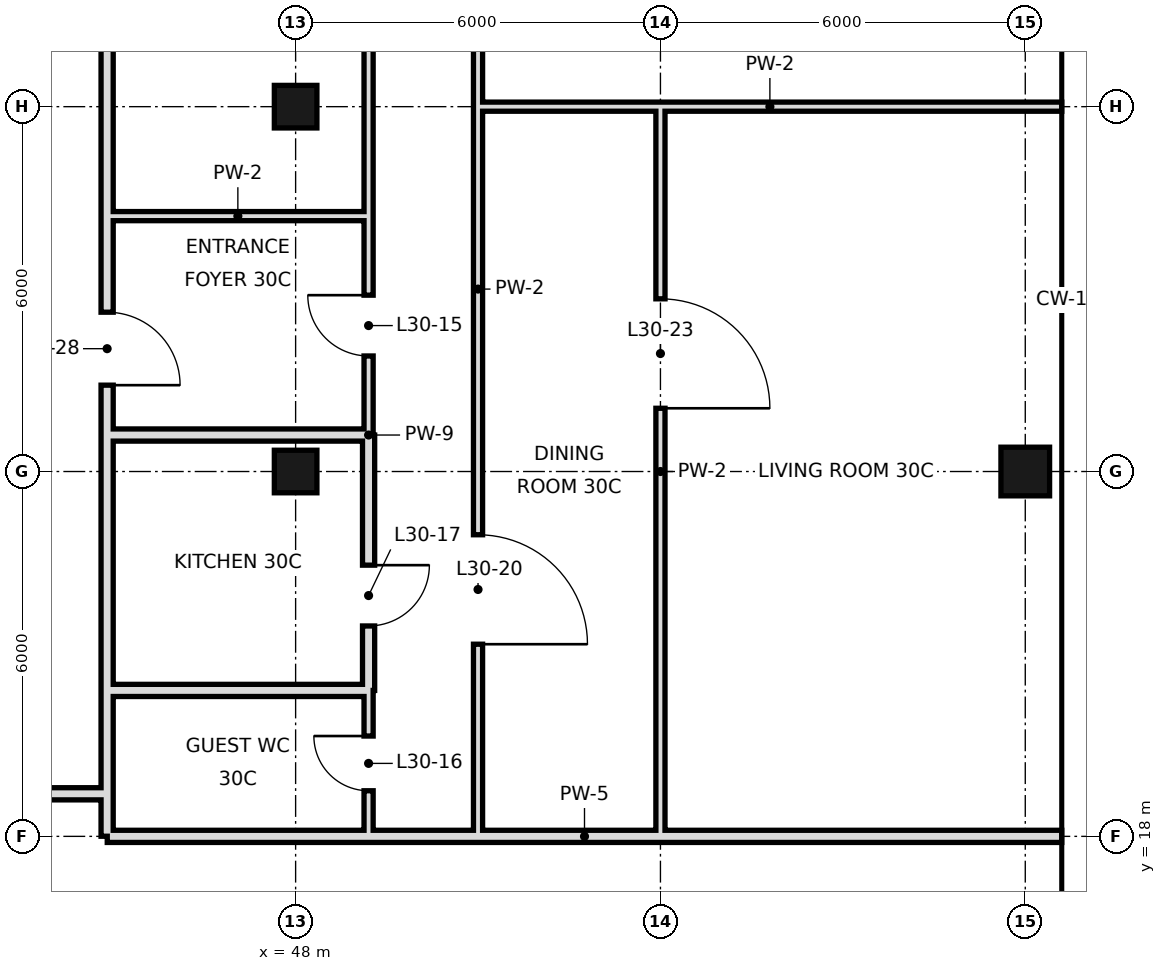
"""IFC4 building model, lengths in metres.
Left out: names, types, materials, properties, quantities, classifications, styles, units other than length and angle.
Written with IfcOpenShell. Run it as: python <this file> out.ifc"""

import sys

from ifc_helpers import new_model, si_unit, direction, frame, frame_2d, origin, origin_2d, place, context, subcontext, project, spatial, rectangle, hollow_rectangle, extrude, element, fill, save


model = new_model("IFC4")
c1 = context("Model", 3, precision=1e-05, world=origin(), true_north=direction((0.0, 1.0)))
c2 = subcontext(c1, "Body", "Model", "MODEL_VIEW")
j1 = project(units=[si_unit("LENGTHUNIT", "METRE"), si_unit("PLANEANGLEUNIT", "RADIAN")], contexts=[c1])
p1 = place(None, origin())
s1 = spatial("IfcSite", under=j1, at=p1, CompositionType="ELEMENT")
p2 = place(p1, origin())
s2 = spatial("IfcBuilding", under=s1, at=p2, CompositionType="ELEMENT")
p3 = place(p2, frame((0.0, 0.0, 134.0)))
s3 = spatial("IfcBuildingStorey", under=s2, at=p3, CompositionType="ELEMENT", Elevation=134.0)
for number, where, z_axis, x_axis in (
    (1, (48.0, 24.0, 0.0), (0.0, 0.0, 1.0), (1.0, 0.0, 0.0)),
    (2, (48.0, 30.0, 0.0), (0.0, 0.0, 1.0), (1.0, 0.0, 0.0)),
):
    element("IfcColumn", number, at=place(p3, frame(where, z_axis=z_axis, x_axis=x_axis)), inside=s3, PredefinedType="COLUMN", context=c2, shape_type="SweptSolid", body=[
        extrude(hollow_rectangle(XDim=0.7, YDim=0.7, WallThickness=0.036, at=origin_2d()), origin(), (0.0, 0.0, 1.0), 4.4),
    ])
p4 = place(p3, frame((60.0, 24.0, 0.0), z_axis=(0.0, 0.0, 1.0), x_axis=(1.0, 0.0, 0.0)))
e3 = element("IfcColumn", 3, at=p4, inside=s3, PredefinedType="COLUMN", context=c2, shape_type="SweptSolid", body=[
    extrude(hollow_rectangle(XDim=0.8, YDim=0.8, WallThickness=0.04, at=origin_2d()), origin(), (0.0, 0.0, 1.0), 4.4),
])
p5 = place(p3, frame((44.9, 18.002, 0.0), z_axis=(0.0, 0.0, 1.0), x_axis=(0.0, 1.0, 0.0)))
e4 = element("IfcWall", 4, at=p5, inside=s3, PredefinedType="SOLIDWALL", context=c2, shape_type="SweptSolid", body=[
    extrude(rectangle(XDim=2.398, YDim=0.2, at=frame_2d((1.199, 0.0))), origin(), (0.0, 0.0, 1.0), 4.1),
])
p6 = place(p3, frame((44.9, 24.6, 0.0), z_axis=(0.0, 0.0, 1.0), x_axis=(0.0, 1.0, 0.0)))
e5 = element("IfcWall", 5, at=p6, inside=s3, PredefinedType="SOLIDWALL", context=c2, shape_type="SweptSolid", body=[
    extrude(rectangle(XDim=24.0, YDim=0.2, at=frame_2d((12.0, 0.0))), origin(), (0.0, 0.0, 1.0), 3.4),
])
p7 = place(p6, frame((0.82, 0.0, 0.0)))
e6 = element("IfcOpeningElement", 6, at=p7, cuts=e5, PredefinedType="OPENING", context=c2, shape_type="SweptSolid", body=[
    extrude(rectangle(XDim=1.2, YDim=2.4, at=frame_2d((0.6, 1.2))), frame((0.0, 0.11, 0.0), z_axis=(0.0, -1.0, 0.0), x_axis=(1.0, 0.0, 0.0)), (0.0, 0.0, 1.0), 0.22),
])
p8 = place(p3, frame((44.9, 20.4, 0.0), z_axis=(0.0, 0.0, 1.0), x_axis=(0.0, 1.0, 0.0)))
e7 = element("IfcWall", 7, at=p8, inside=s3, PredefinedType="SOLIDWALL", context=c2, shape_type="SweptSolid", body=[
    extrude(rectangle(XDim=4.2, YDim=0.2, at=frame_2d((2.1, 0.0))), origin(), (0.0, 0.0, 1.0), 4.1),
])
p9 = place(p3, frame((49.2, 20.4, 0.0), z_axis=(0.0, 0.0, 1.0), x_axis=(0.0, 1.0, 0.0)))
e8 = element("IfcWall", 8, at=p9, inside=s3, PredefinedType="SOLIDWALL", context=c2, shape_type="SweptSolid", body=[
    extrude(rectangle(XDim=4.2, YDim=0.2, at=frame_2d((2.1, 0.0))), origin(), (0.0, 0.0, 1.0), 3.4),
])
p10 = place(p9, frame((1.06, 0.0, 0.0)))
e9 = element("IfcOpeningElement", 9, at=p10, cuts=e8, PredefinedType="OPENING", context=c2, shape_type="SweptSolid", body=[
    extrude(rectangle(XDim=1.0, YDim=2.4, at=frame_2d((0.5, 1.2))), frame((0.0, 0.11, 0.0), z_axis=(0.0, -1.0, 0.0), x_axis=(1.0, 0.0, 0.0)), (0.0, 0.0, 1.0), 0.22),
])
p11 = place(p3, frame((49.2, 24.6, 0.0), z_axis=(0.0, 0.0, 1.0), x_axis=(0.0, 1.0, 0.0)))
e10 = element("IfcWall", 10, at=p11, inside=s3, PredefinedType="PARTITIONING", context=c2, shape_type="SweptSolid", body=[
    extrude(rectangle(XDim=24.0, YDim=0.15, at=frame_2d((12.0, 0.0))), origin(), (0.0, 0.0, 1.0), 4.1),
])
p12 = place(p11, frame((1.3, 0.0, 0.0)))
e11 = element("IfcOpeningElement", 11, at=p12, cuts=e10, PredefinedType="OPENING", context=c2, shape_type="SweptSolid", body=[
    extrude(rectangle(XDim=1.0, YDim=2.4, at=frame_2d((0.5, 1.2))), frame((0.0, 0.085, 0.0), z_axis=(0.0, -1.0, 0.0), x_axis=(1.0, 0.0, 0.0)), (0.0, 0.0, 1.0), 0.17),
])
p13 = place(p11, frame((7.0, 0.0, 0.0)))
e12 = element("IfcOpeningElement", 12, at=p13, cuts=e10, PredefinedType="OPENING", context=c2, shape_type="SweptSolid", body=[
    extrude(rectangle(XDim=1.0, YDim=2.4, at=frame_2d((0.5, 1.2))), frame((0.0, 0.085, 0.0), z_axis=(0.0, -1.0, 0.0), x_axis=(1.0, 0.0, 0.0)), (0.0, 0.0, 1.0), 0.17),
])
p14 = place(p11, frame((14.8, 0.0, 0.0)))
e13 = element("IfcOpeningElement", 13, at=p14, cuts=e10, PredefinedType="OPENING", context=c2, shape_type="SweptSolid", body=[
    extrude(rectangle(XDim=1.0, YDim=2.4, at=frame_2d((0.5, 1.2))), frame((0.0, 0.085, 0.0), z_axis=(0.0, -1.0, 0.0), x_axis=(1.0, 0.0, 0.0)), (0.0, 0.0, 1.0), 0.17),
])
p15 = place(p3, frame((49.2, 18.0, 0.0), z_axis=(0.0, 0.0, 1.0), x_axis=(0.0, 1.0, 0.0)))
e14 = element("IfcWall", 14, at=p15, inside=s3, PredefinedType="PARTITIONING", context=c2, shape_type="SweptSolid", body=[
    extrude(rectangle(XDim=2.4, YDim=0.15, at=frame_2d((1.2, 0.0))), origin(), (0.0, 0.0, 1.0), 4.1),
])
p16 = place(p15, frame((0.75, 0.0, 0.0)))
e15 = element("IfcOpeningElement", 15, at=p16, cuts=e14, PredefinedType="OPENING", context=c2, shape_type="SweptSolid", body=[
    extrude(rectangle(XDim=0.9, YDim=2.4, at=frame_2d((0.45, 1.2))), frame((0.0, 0.085, 0.0), z_axis=(0.0, -1.0, 0.0), x_axis=(1.0, 0.0, 0.0)), (0.0, 0.0, 1.0), 0.17),
])
p17 = place(p3, frame((51.0, 18.0, 0.0), z_axis=(0.0, 0.0, 1.0), x_axis=(0.0, 1.0, 0.0)))
e16 = element("IfcWall", 16, at=p17, inside=s3, PredefinedType="PARTITIONING", context=c2, shape_type="SweptSolid", body=[
    extrude(rectangle(XDim=18.0, YDim=0.15, at=frame_2d((9.0, 0.0))), origin(), (0.0, 0.0, 1.0), 4.1),
])
p18 = place(p17, frame((3.16, 0.0, 0.0)))
e17 = element("IfcOpeningElement", 17, at=p18, cuts=e16, PredefinedType="OPENING", context=c2, shape_type="SweptSolid", body=[
    extrude(rectangle(XDim=1.8, YDim=2.4, at=frame_2d((0.9, 1.2))), frame((0.0, 0.085, 0.0), z_axis=(0.0, -1.0, 0.0), x_axis=(1.0, 0.0, 0.0)), (0.0, 0.0, 1.0), 0.17),
])
p19 = place(p17, frame((13.6, 0.0, 0.0)))
e18 = element("IfcOpeningElement", 18, at=p19, cuts=e16, PredefinedType="OPENING", context=c2, shape_type="SweptSolid", body=[
    extrude(rectangle(XDim=1.0, YDim=2.4, at=frame_2d((0.5, 1.2))), frame((0.0, 0.085, 0.0), z_axis=(0.0, -1.0, 0.0), x_axis=(1.0, 0.0, 0.0)), (0.0, 0.0, 1.0), 0.17),
])
p20 = place(p3, frame((54.0, 18.0, 0.0), z_axis=(0.0, 0.0, 1.0), x_axis=(0.0, 1.0, 0.0)))
e19 = element("IfcWall", 19, at=p20, inside=s3, PredefinedType="PARTITIONING", context=c2, shape_type="SweptSolid", body=[
    extrude(rectangle(XDim=12.0, YDim=0.15, at=frame_2d((6.0, 0.0))), origin(), (0.0, 0.0, 1.0), 4.1),
])
p21 = place(p20, frame((7.04, 0.0, 0.0)))
e20 = element("IfcOpeningElement", 20, at=p21, cuts=e19, PredefinedType="OPENING", context=c2, shape_type="SweptSolid", body=[
    extrude(rectangle(XDim=1.8, YDim=2.4, at=frame_2d((0.9, 1.2))), frame((0.0, 0.085, 0.0), z_axis=(0.0, -1.0, 0.0), x_axis=(1.0, 0.0, 0.0)), (0.0, 0.0, 1.0), 0.17),
])
p22 = place(p3, frame((44.902, 18.0, 0.0), z_axis=(0.0, 0.0, 1.0), x_axis=(1.0, 0.0, 0.0)))
e21 = element("IfcWall", 21, at=p22, inside=s3, PredefinedType="SOLIDWALL", context=c2, shape_type="SweptSolid", body=[
    extrude(rectangle(XDim=15.698, YDim=0.2, at=frame_2d((7.849, 0.0))), origin(), (0.0, 0.0, 1.0), 3.4),
])
p23 = place(p3, frame((3.1, 18.7, 0.0), z_axis=(0.0, 0.0, 1.0), x_axis=(1.0, 0.0, 0.0)))
e22 = element("IfcWall", 22, at=p23, inside=s3, PredefinedType="SOLIDWALL", context=c2, shape_type="SweptSolid", body=[
    extrude(rectangle(XDim=41.8, YDim=0.2, at=frame_2d((20.9, 0.0))), origin(), (0.0, 0.0, 1.0), 3.4),
])
p24 = place(p23, frame((14.04, 0.0, 0.0)))
e23 = element("IfcOpeningElement", 23, at=p24, cuts=e22, PredefinedType="OPENING", context=c2, shape_type="SweptSolid", body=[
    extrude(rectangle(XDim=1.2, YDim=2.4, at=frame_2d((0.6, 1.2))), frame((0.0, 0.11, 0.0), z_axis=(0.0, -1.0, 0.0), x_axis=(1.0, 0.0, 0.0)), (0.0, 0.0, 1.0), 0.22),
])
p25 = place(p23, frame((26.73, 0.0, 0.0)))
e24 = element("IfcOpeningElement", 24, at=p25, cuts=e22, PredefinedType="OPENING", context=c2, shape_type="SweptSolid", body=[
    extrude(rectangle(XDim=1.8, YDim=2.4, at=frame_2d((0.9, 1.2))), frame((0.0, 0.11, 0.0), z_axis=(0.0, -1.0, 0.0), x_axis=(1.0, 0.0, 0.0)), (0.0, 0.0, 1.0), 0.22),
])
p26 = place(p3, frame((44.9, 20.4, 0.0), z_axis=(0.0, 0.0, 1.0), x_axis=(1.0, 0.0, 0.0)))
e25 = element("IfcWall", 25, at=p26, inside=s3, PredefinedType="SOLIDWALL", context=c2, shape_type="SweptSolid", body=[
    extrude(rectangle(XDim=4.3, YDim=0.2, at=frame_2d((2.15, 0.0))), origin(), (0.0, 0.0, 1.0), 3.4),
])
p27 = place(p3, frame((44.9, 24.6, 0.0), z_axis=(0.0, 0.0, 1.0), x_axis=(1.0, 0.0, 0.0)))
e26 = element("IfcWall", 26, at=p27, inside=s3, PredefinedType="SOLIDWALL", context=c2, shape_type="SweptSolid", body=[
    extrude(rectangle(XDim=4.3, YDim=0.2, at=frame_2d((2.15, 0.0))), origin(), (0.0, 0.0, 1.0), 3.65),
])
p28 = place(p3, frame((44.9, 28.2, 0.0), z_axis=(0.0, 0.0, 1.0), x_axis=(1.0, 0.0, 0.0)))
e27 = element("IfcWall", 27, at=p28, inside=s3, PredefinedType="PARTITIONING", context=c2, shape_type="SweptSolid", body=[
    extrude(rectangle(XDim=4.3, YDim=0.15, at=frame_2d((2.15, 0.0))), origin(), (0.0, 0.0, 1.0), 4.1),
])
p29 = place(p3, frame((51.0, 30.0, 0.0), z_axis=(0.0, 0.0, 1.0), x_axis=(1.0, 0.0, 0.0)))
e28 = element("IfcWall", 28, at=p29, inside=s3, PredefinedType="PARTITIONING", context=c2, shape_type="SweptSolid", body=[
    extrude(rectangle(XDim=9.6, YDim=0.15, at=frame_2d((4.8, 0.0))), origin(), (0.0, 0.0, 1.0), 3.4),
])
p30 = place(p12, frame((1.0, 0.0, 0.0), z_axis=(0.0, 0.0, 1.0), x_axis=(-1.0, 0.0, 0.0)))
e29 = element("IfcDoor", 29, at=p30, inside=s3, OperationType="SINGLE_SWING_LEFT", PredefinedType="DOOR", context=c2, shape_type="SweptSolid", body=[
    extrude(rectangle(XDim=1.0, YDim=2.4, at=frame_2d((0.5, 1.2))), frame((0.0, 0.025, 0.0), z_axis=(0.0, -1.0, 0.0), x_axis=(1.0, 0.0, 0.0)), (0.0, 0.0, 1.0), 0.05),
])
fill(e11, e29)
p31 = place(p16, frame((0.9, 0.0, 0.0), z_axis=(0.0, 0.0, 1.0), x_axis=(-1.0, 0.0, 0.0)))
e30 = element("IfcDoor", 30, at=p31, inside=s3, OperationType="SINGLE_SWING_LEFT", PredefinedType="DOOR", context=c2, shape_type="SweptSolid", body=[
    extrude(rectangle(XDim=0.9, YDim=2.4, at=frame_2d((0.45, 1.2))), frame((0.0, 0.025, 0.0), z_axis=(0.0, -1.0, 0.0), x_axis=(1.0, 0.0, 0.0)), (0.0, 0.0, 1.0), 0.05),
])
fill(e15, e30)
p32 = place(p10, origin())
e31 = element("IfcDoor", 31, at=p32, inside=s3, OperationType="SINGLE_SWING_RIGHT", PredefinedType="DOOR", context=c2, shape_type="SweptSolid", body=[
    extrude(rectangle(XDim=1.0, YDim=2.4, at=frame_2d((0.5, 1.2))), frame((0.0, 0.025, 0.0), z_axis=(0.0, -1.0, 0.0), x_axis=(1.0, 0.0, 0.0)), (0.0, 0.0, 1.0), 0.05),
])
fill(e9, e31)
p33 = place(p18, frame((1.8, 0.0, 0.0), z_axis=(0.0, 0.0, 1.0), x_axis=(-1.0, 0.0, 0.0)))
e32 = element("IfcDoor", 32, at=p33, inside=s3, OperationType="SINGLE_SWING_RIGHT", PredefinedType="DOOR", context=c2, shape_type="SweptSolid", body=[
    extrude(rectangle(XDim=1.8, YDim=2.4, at=frame_2d((0.9, 1.2))), frame((0.0, 0.025, 0.0), z_axis=(0.0, -1.0, 0.0), x_axis=(1.0, 0.0, 0.0)), (0.0, 0.0, 1.0), 0.05),
])
fill(e17, e32)
p34 = place(p21, frame((1.8, 0.0, 0.0), z_axis=(0.0, 0.0, 1.0), x_axis=(-1.0, 0.0, 0.0)))
e33 = element("IfcDoor", 33, at=p34, inside=s3, OperationType="SINGLE_SWING_RIGHT", PredefinedType="DOOR", context=c2, shape_type="SweptSolid", body=[
    extrude(rectangle(XDim=1.8, YDim=2.4, at=frame_2d((0.9, 1.2))), frame((0.0, 0.025, 0.0), z_axis=(0.0, -1.0, 0.0), x_axis=(1.0, 0.0, 0.0)), (0.0, 0.0, 1.0), 0.05),
])
fill(e20, e33)
p35 = place(p7, frame((1.2, 0.0, 0.0), z_axis=(0.0, 0.0, 1.0), x_axis=(-1.0, 0.0, 0.0)))
e34 = element("IfcDoor", 34, at=p35, inside=s3, OperationType="SINGLE_SWING_RIGHT", PredefinedType="DOOR", context=c2, shape_type="SweptSolid", body=[
    extrude(rectangle(XDim=1.2, YDim=2.4, at=frame_2d((0.6, 1.2))), frame((0.0, 0.025, 0.0), z_axis=(0.0, -1.0, 0.0), x_axis=(1.0, 0.0, 0.0)), (0.0, 0.0, 1.0), 0.05),
])
fill(e6, e34)
save(model, sys.argv[1])
